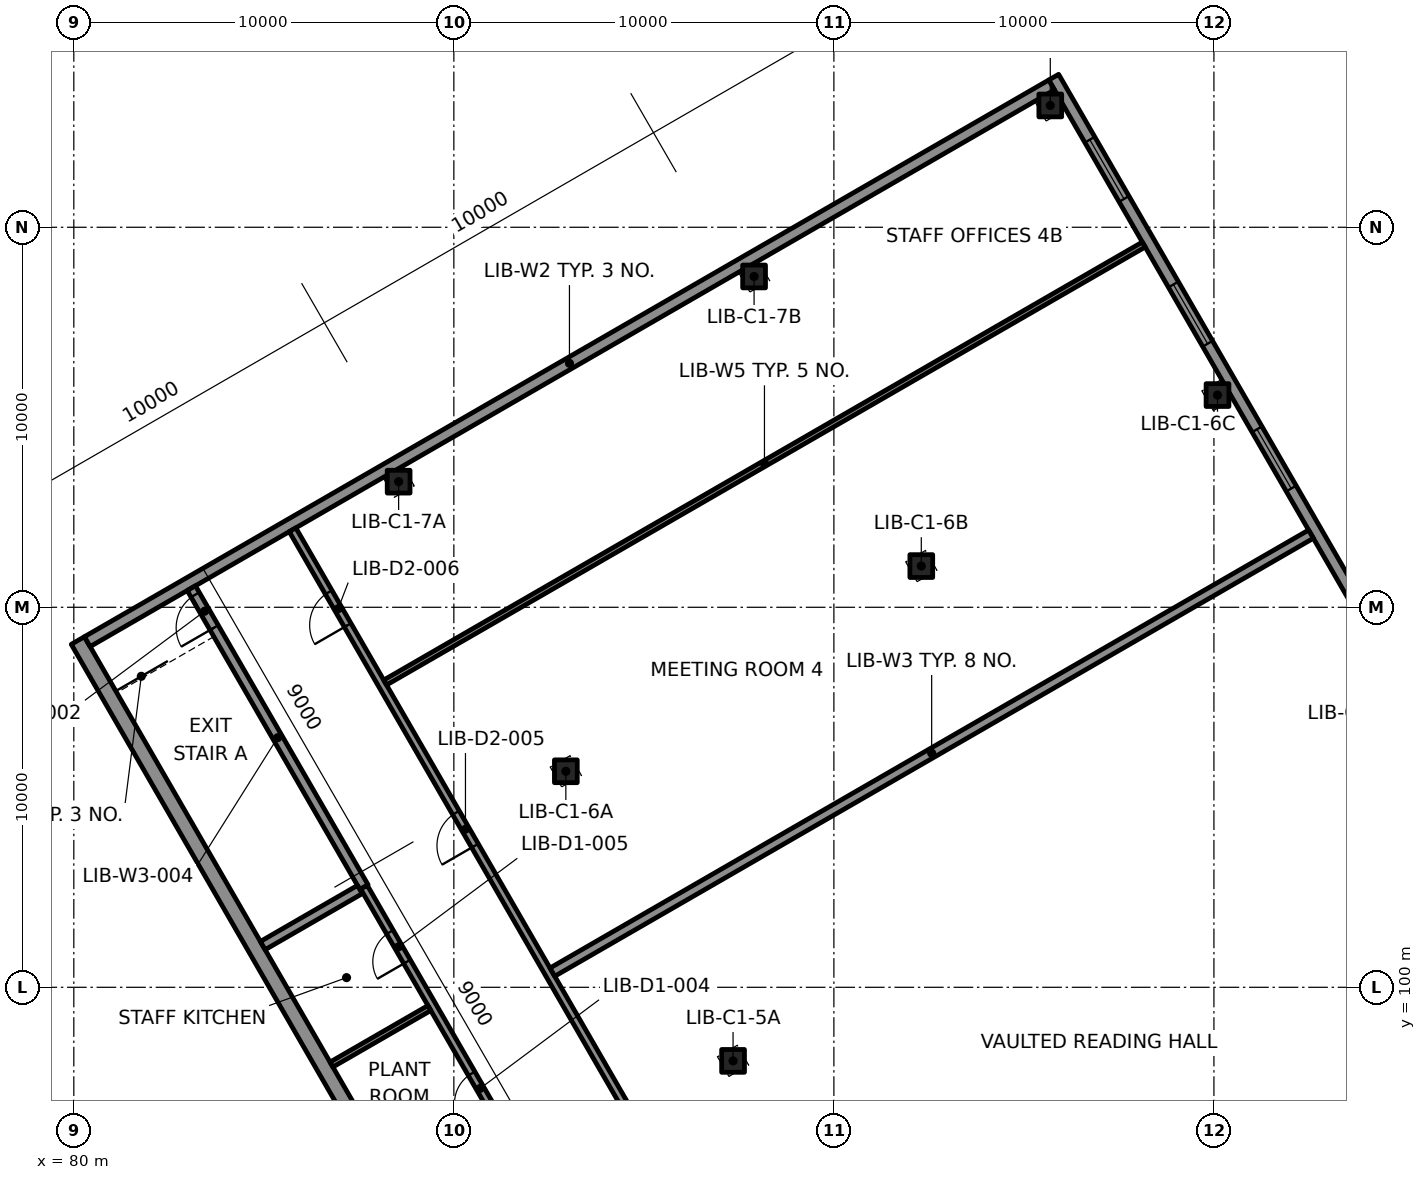
"""IFC4 building model, lengths in metres.
Left out: names, types, materials, properties, quantities, classifications, styles, units other than length and angle.
Written with IfcOpenShell. Run it as: python <this file> out.ifc"""

import sys

from ifc_helpers import new_model, si_unit, direction, frame, frame_2d, origin, origin_2d, place, context, subcontext, project, spatial, rectangle, extrude, element, fill, save


model = new_model("IFC4")
c1 = context("Model", 3, precision=1e-05, world=origin(), true_north=direction((0.0, 1.0)))
c2 = subcontext(c1, "Body", "Model", "MODEL_VIEW")
j1 = project(units=[si_unit("LENGTHUNIT", "METRE"), si_unit("PLANEANGLEUNIT", "RADIAN")], contexts=[c1])
p1 = place(None, origin())
s1 = spatial("IfcSite", under=j1, at=p1, CompositionType="ELEMENT")
p2 = place(p1, origin())
s2 = spatial("IfcBuilding", under=s1, at=p2, CompositionType="ELEMENT")
p3 = place(p2, frame((0.0, 0.0, 21.8)))
s3 = spatial("IfcBuildingStorey", under=s2, at=p3, CompositionType="ELEMENT", Elevation=21.8)
p4 = place(p3, frame((82.621, 101.57, -0.0), z_axis=(0.0, 0.0, 1.0), x_axis=(-0.5, 0.866025403784, 0.0)))
e1 = element("IfcColumn", 1, at=p4, inside=s3, PredefinedType="COLUMN", context=c2, shape_type="SweptSolid", body=[
    extrude(rectangle(XDim=1.2, YDim=1.5, at=origin_2d()), origin(), (0.0, 0.0, 1.0), 4.6),
])
p5 = place(p3, frame((75.975, 98.1, 0.0), z_axis=(0.0, 0.0, 1.0), x_axis=(1.0, 0.0, 0.0)))
e2 = element("IfcWall", 2, at=p5, inside=s3, PredefinedType="PARTITIONING", context=c2, shape_type="SweptSolid", body=[
    extrude(rectangle(XDim=5.649, YDim=0.15, at=frame_2d((2.825, 0.0))), origin(), (0.0, 0.0, 1.0), 3.7),
])
p6 = place(p5, frame((2.375, 0.0, 0.0)))
e3 = element("IfcOpeningElement", 3, at=p6, cuts=e2, PredefinedType="OPENING", context=c2, shape_type="SweptSolid", body=[
    extrude(rectangle(XDim=0.9, YDim=2.1, at=frame_2d((0.45, 1.05))), frame((0.0, 0.085, 0.0), z_axis=(0.0, -1.0, 0.0), x_axis=(1.0, 0.0, 0.0)), (0.0, 0.0, 1.0), 0.17),
])
p7 = place(p3, frame((81.7, 87.5, 0.0), z_axis=(0.0, 0.0, 1.0), x_axis=(0.0, 1.0, 0.0)))
e4 = element("IfcWall", 4, at=p7, inside=s3, PredefinedType="PARTITIONING", context=c2, shape_type="SweptSolid", body=[
    extrude(rectangle(XDim=10.599, YDim=0.15, at=frame_2d((5.3, 0.0))), origin(), (0.0, 0.0, 1.0), 3.7),
])
for number, where, z_axis, x_axis in (
    (5, (97.347, 98.063, -0.36), (0.0, 0.0, 1.0), (1.0, 0.0, 0.0)),
    (6, (92.947, 105.684, -0.36), (0.0, 0.0, 1.0), (1.0, 0.0, 0.0)),
    (7, (102.3, 111.084, -0.36), (0.0, 0.0, 1.0), (1.0, 0.0, 0.0)),
    (8, (110.094, 115.584, -0.36), (0.0, 0.0, 1.0), (1.0, 0.0, 0.0)),
    (9, (88.547, 113.305, -0.36), (0.0, 0.0, 1.0), (1.0, 0.0, 0.0)),
    (10, (97.9, 118.705, -0.36), (0.0, 0.0, 1.0), (1.0, 0.0, 0.0)),
    (11, (105.694, 123.205, -0.36), (0.0, 0.0, 1.0), (1.0, 0.0, 0.0)),
):
    element("IfcColumn", number, at=place(p3, frame(where, z_axis=z_axis, x_axis=x_axis)), inside=s3, PredefinedType="COLUMN", context=c2, shape_type="SweptSolid", body=[
        extrude(rectangle(XDim=0.6, YDim=0.6, at=origin_2d()), origin(), (0.0, 0.0, 1.0), 4.66),
    ])
p8 = place(p3, frame((107.106, 62.36, 0.0), z_axis=(0.0, 0.0, 1.0), x_axis=(-0.49999992739, 0.866025445706, 0.0)))
e12 = element("IfcWall", 12, at=p8, inside=s3, PredefinedType="SOLIDWALL", context=c2, shape_type="SweptSolid", body=[
    extrude(rectangle(XDim=54.0, YDim=0.4, at=frame_2d((27.0, 0.0))), origin(), (0.0, 0.0, 1.0), 4.3),
])
p9 = place(p3, frame((132.784, 77.185, 0.0), z_axis=(0.0, 0.0, 1.0), x_axis=(-0.49999992739, 0.866025445706, 0.0)))
e13 = element("IfcWall", 13, at=p9, inside=s3, PredefinedType="SOLIDWALL", context=c2, shape_type="SweptSolid", body=[
    extrude(rectangle(XDim=54.0, YDim=0.3, at=frame_2d((27.0, 0.0))), origin(), (0.0, 0.0, 1.0), 4.3),
])
p10 = place(p9, frame((1.9, 0.0, 0.9)))
e14 = element("IfcOpeningElement", 14, at=p10, cuts=e13, PredefinedType="OPENING", context=c2, shape_type="SweptSolid", body=[
    extrude(rectangle(XDim=1.8, YDim=2.4, at=frame_2d((0.9, 1.2))), frame((0.0, 0.16, 0.0), z_axis=(0.0, -1.0, 0.0), x_axis=(1.0, 0.0, 0.0)), (0.0, 0.0, 1.0), 0.32),
])
p11 = place(p9, frame((6.3, 0.0, 0.9)))
e15 = element("IfcOpeningElement", 15, at=p11, cuts=e13, PredefinedType="OPENING", context=c2, shape_type="SweptSolid", body=[
    extrude(rectangle(XDim=1.8, YDim=2.4, at=frame_2d((0.9, 1.2))), frame((0.0, 0.16, 0.0), z_axis=(0.0, -1.0, 0.0), x_axis=(1.0, 0.0, 0.0)), (0.0, 0.0, 1.0), 0.32),
])
p12 = place(p9, frame((10.7, 0.0, 0.9)))
e16 = element("IfcOpeningElement", 16, at=p12, cuts=e13, PredefinedType="OPENING", context=c2, shape_type="SweptSolid", body=[
    extrude(rectangle(XDim=1.8, YDim=2.4, at=frame_2d((0.9, 1.2))), frame((0.0, 0.16, 0.0), z_axis=(0.0, -1.0, 0.0), x_axis=(1.0, 0.0, 0.0)), (0.0, 0.0, 1.0), 0.32),
])
p13 = place(p9, frame((15.1, 0.0, 0.9)))
e17 = element("IfcOpeningElement", 17, at=p13, cuts=e13, PredefinedType="OPENING", context=c2, shape_type="SweptSolid", body=[
    extrude(rectangle(XDim=1.8, YDim=2.4, at=frame_2d((0.9, 1.2))), frame((0.0, 0.16, 0.0), z_axis=(0.0, -1.0, 0.0), x_axis=(1.0, 0.0, 0.0)), (0.0, 0.0, 1.0), 0.32),
])
p14 = place(p9, frame((19.5, 0.0, 0.9)))
e18 = element("IfcOpeningElement", 18, at=p14, cuts=e13, PredefinedType="OPENING", context=c2, shape_type="SweptSolid", body=[
    extrude(rectangle(XDim=1.8, YDim=2.4, at=frame_2d((0.9, 1.2))), frame((0.0, 0.16, 0.0), z_axis=(0.0, -1.0, 0.0), x_axis=(1.0, 0.0, 0.0)), (0.0, 0.0, 1.0), 0.32),
])
p15 = place(p9, frame((41.5, 0.0, 0.9)))
e19 = element("IfcOpeningElement", 19, at=p15, cuts=e13, PredefinedType="OPENING", context=c2, shape_type="SweptSolid", body=[
    extrude(rectangle(XDim=1.8, YDim=2.4, at=frame_2d((0.9, 1.2))), frame((0.0, 0.16, 0.0), z_axis=(0.0, -1.0, 0.0), x_axis=(1.0, 0.0, 0.0)), (0.0, 0.0, 1.0), 0.32),
])
p16 = place(p9, frame((45.9, 0.0, 0.9)))
e20 = element("IfcOpeningElement", 20, at=p16, cuts=e13, PredefinedType="OPENING", context=c2, shape_type="SweptSolid", body=[
    extrude(rectangle(XDim=1.8, YDim=2.4, at=frame_2d((0.9, 1.2))), frame((0.0, 0.16, 0.0), z_axis=(0.0, -1.0, 0.0), x_axis=(1.0, 0.0, 0.0)), (0.0, 0.0, 1.0), 0.32),
])
p17 = place(p9, frame((50.3, 0.0, 0.9)))
e21 = element("IfcOpeningElement", 21, at=p17, cuts=e13, PredefinedType="OPENING", context=c2, shape_type="SweptSolid", body=[
    extrude(rectangle(XDim=1.8, YDim=2.4, at=frame_2d((0.9, 1.2))), frame((0.0, 0.16, 0.0), z_axis=(0.0, -1.0, 0.0), x_axis=(1.0, 0.0, 0.0)), (0.0, 0.0, 1.0), 0.32),
])
p18 = place(p3, frame((80.354, 109.095, 0.0), z_axis=(0.0, 0.0, 1.0), x_axis=(0.866026568746, 0.499997982221, 0.0)))
e22 = element("IfcWall", 22, at=p18, inside=s3, PredefinedType="SOLIDWALL", context=c2, shape_type="SweptSolid", body=[
    extrude(rectangle(XDim=29.3, YDim=0.3, at=frame_2d((14.65, 0.0))), origin(), (0.0, 0.0, 1.0), 4.3),
])
p19 = place(p3, frame((87.635, 102.635, 0.0), z_axis=(0.0, 0.0, 1.0), x_axis=(-0.499994616197, 0.866028512102, 0.0)))
e23 = element("IfcWall", 23, at=p19, inside=s3, PredefinedType="SOLIDWALL", context=c2, shape_type="SweptSolid", body=[
    extrude(rectangle(XDim=9.085, YDim=0.25, at=frame_2d((4.542, 0.0))), origin(), (0.0, 0.0, 1.0), 4.3),
])
p20 = place(p19, frame((7.885, 0.0, 0.0)))
e24 = element("IfcOpeningElement", 24, at=p20, cuts=e23, PredefinedType="OPENING", context=c2, shape_type="SweptSolid", body=[
    extrude(rectangle(XDim=1.0, YDim=2.1, at=frame_2d((0.5, 1.05))), frame((0.0, 0.135, 0.0), z_axis=(0.0, -1.0, 0.0), x_axis=(1.0, 0.0, 0.0)), (0.0, 0.0, 1.0), 0.27),
])
p21 = place(p3, frame((94.93, 90.0, 0.0), z_axis=(0.0, 0.0, 1.0), x_axis=(-0.499997667785, 0.866026750285, 0.0)))
e25 = element("IfcWall", 25, at=p21, inside=s3, PredefinedType="PARTITIONING", context=c2, shape_type="SweptSolid", body=[
    extrude(rectangle(XDim=14.59, YDim=0.2, at=frame_2d((7.295, 0.0))), origin(), (0.0, 0.0, 1.0), 4.3),
])
p22 = place(p21, frame((1.235, 0.0, 0.0)))
e26 = element("IfcOpeningElement", 26, at=p22, cuts=e25, PredefinedType="OPENING", context=c2, shape_type="SweptSolid", body=[
    extrude(rectangle(XDim=1.0, YDim=2.1, at=frame_2d((0.5, 1.05))), frame((0.0, 0.11, 0.0), z_axis=(0.0, -1.0, 0.0), x_axis=(1.0, 0.0, 0.0)), (0.0, 0.0, 1.0), 0.22),
])
p23 = place(p21, frame((4.275, 0.0, 0.0)))
e27 = element("IfcOpeningElement", 27, at=p23, cuts=e25, PredefinedType="OPENING", context=c2, shape_type="SweptSolid", body=[
    extrude(rectangle(XDim=0.9, YDim=2.1, at=frame_2d((0.45, 1.05))), frame((0.0, 0.11, 0.0), z_axis=(0.0, -1.0, 0.0), x_axis=(1.0, 0.0, 0.0)), (0.0, 0.0, 1.0), 0.22),
])
p24 = place(p21, frame((8.025, 0.0, 0.0)))
e28 = element("IfcOpeningElement", 28, at=p24, cuts=e25, PredefinedType="OPENING", context=c2, shape_type="SweptSolid", body=[
    extrude(rectangle(XDim=0.9, YDim=2.1, at=frame_2d((0.45, 1.05))), frame((0.0, 0.11, 0.0), z_axis=(0.0, -1.0, 0.0), x_axis=(1.0, 0.0, 0.0)), (0.0, 0.0, 1.0), 0.22),
])
p25 = place(p21, frame((12.325, 0.0, 0.0)))
e29 = element("IfcOpeningElement", 29, at=p25, cuts=e25, PredefinedType="OPENING", context=c2, shape_type="SweptSolid", body=[
    extrude(rectangle(XDim=0.9, YDim=2.1, at=frame_2d((0.45, 1.05))), frame((0.0, 0.11, 0.0), z_axis=(0.0, -1.0, 0.0), x_axis=(1.0, 0.0, 0.0)), (0.0, 0.0, 1.0), 0.22),
])
p26 = place(p3, frame((86.779, 97.967, 0.0), z_axis=(0.0, 0.0, 1.0), x_axis=(0.866053027861, 0.499952150643, 0.0)))
e30 = element("IfcWall", 30, at=p26, inside=s3, PredefinedType="PARTITIONING", context=c2, shape_type="SweptSolid", body=[
    extrude(rectangle(XDim=2.975, YDim=0.15, at=frame_2d((1.487, 0.0))), origin(), (0.0, 0.0, 1.0), 4.3),
])
p27 = place(p3, frame((84.972, 101.097, 0.0), z_axis=(0.0, 0.0, 1.0), x_axis=(0.866039495442, 0.49997559174, 0.0)))
e31 = element("IfcWall", 31, at=p27, inside=s3, PredefinedType="SOLIDWALL", context=c2, shape_type="SweptSolid", body=[
    extrude(rectangle(XDim=2.95, YDim=0.25, at=frame_2d((1.475, 0.0))), origin(), (0.0, 0.0, 1.0), 4.3),
])
p28 = place(p3, frame((112.496, 65.725, 0.0), z_axis=(0.0, 0.0, 1.0), x_axis=(-0.499998673217, 0.866026169802, 0.0)))
e32 = element("IfcWall", 32, at=p28, inside=s3, PredefinedType="PARTITIONING", context=c2, shape_type="SweptSolid", body=[
    extrude(rectangle(XDim=53.48, YDim=0.2, at=frame_2d((26.74, 0.0))), origin(), (0.0, 0.0, 1.0), 4.3),
])
p29 = place(p28, frame((13.08, 0.0, 0.0)))
e33 = element("IfcOpeningElement", 33, at=p29, cuts=e32, PredefinedType="OPENING", context=c2, shape_type="SweptSolid", body=[
    extrude(rectangle(XDim=1.0, YDim=2.1, at=frame_2d((0.5, 1.05))), frame((0.0, 0.11, 0.0), z_axis=(0.0, -1.0, 0.0), x_axis=(1.0, 0.0, 0.0)), (0.0, 0.0, 1.0), 0.22),
])
p30 = place(p28, frame((26.28, 0.0, 0.0)))
e34 = element("IfcOpeningElement", 34, at=p30, cuts=e32, PredefinedType="OPENING", context=c2, shape_type="SweptSolid", body=[
    extrude(rectangle(XDim=1.0, YDim=2.1, at=frame_2d((0.5, 1.05))), frame((0.0, 0.11, 0.0), z_axis=(0.0, -1.0, 0.0), x_axis=(1.0, 0.0, 0.0)), (0.0, 0.0, 1.0), 0.22),
])
p31 = place(p28, frame((43.88, 0.0, 0.0)))
e35 = element("IfcOpeningElement", 35, at=p31, cuts=e32, PredefinedType="OPENING", context=c2, shape_type="SweptSolid", body=[
    extrude(rectangle(XDim=1.0, YDim=2.1, at=frame_2d((0.5, 1.05))), frame((0.0, 0.11, 0.0), z_axis=(0.0, -1.0, 0.0), x_axis=(1.0, 0.0, 0.0)), (0.0, 0.0, 1.0), 0.22),
])
p32 = place(p28, frame((50.58, 0.0, 0.0)))
e36 = element("IfcOpeningElement", 36, at=p32, cuts=e32, PredefinedType="OPENING", context=c2, shape_type="SweptSolid", body=[
    extrude(rectangle(XDim=1.0, YDim=2.1, at=frame_2d((0.5, 1.05))), frame((0.0, 0.11, 0.0), z_axis=(0.0, -1.0, 0.0), x_axis=(1.0, 0.0, 0.0)), (0.0, 0.0, 1.0), 0.22),
])
p33 = place(p3, frame((92.592, 100.399, 0.0), z_axis=(0.0, 0.0, 1.0), x_axis=(0.866022961126, 0.500004230785, 0.0)))
e37 = element("IfcWall", 37, at=p33, inside=s3, PredefinedType="SOLIDWALL", context=c2, shape_type="SweptSolid", body=[
    extrude(rectangle(XDim=23.05, YDim=0.25, at=frame_2d((11.525, 0.0))), origin(), (0.0, 0.0, 1.0), 4.3),
])
p34 = place(p3, frame((88.192, 108.02, 0.0), z_axis=(0.0, 0.0, 1.0), x_axis=(0.866027547497, 0.499996286962, 0.0)))
e38 = element("IfcWall", 38, at=p34, inside=s3, PredefinedType="PARTITIONING", context=c2, shape_type="SweptSolid", body=[
    extrude(rectangle(XDim=23.05, YDim=0.15, at=frame_2d((11.525, 0.0))), origin(), (0.0, 0.0, 1.0), 4.3),
])
p35 = place(p15, origin())
e39 = element("IfcWindow", 39, at=p35, inside=s3, PartitioningType="SINGLE_PANEL", PredefinedType="WINDOW", context=c2, shape_type="SweptSolid", body=[
    extrude(rectangle(XDim=1.8, YDim=2.4, at=frame_2d((0.9, 1.2))), frame((0.0, 0.03, 0.0), z_axis=(0.0, -1.0, 0.0), x_axis=(1.0, 0.0, 0.0)), (0.0, 0.0, 1.0), 0.06),
])
fill(e19, e39)
p36 = place(p16, origin())
e40 = element("IfcWindow", 40, at=p36, inside=s3, PartitioningType="SINGLE_PANEL", PredefinedType="WINDOW", context=c2, shape_type="SweptSolid", body=[
    extrude(rectangle(XDim=1.8, YDim=2.4, at=frame_2d((0.9, 1.2))), frame((0.0, 0.03, 0.0), z_axis=(0.0, -1.0, 0.0), x_axis=(1.0, 0.0, 0.0)), (0.0, 0.0, 1.0), 0.06),
])
fill(e20, e40)
p37 = place(p17, origin())
e41 = element("IfcWindow", 41, at=p37, inside=s3, PartitioningType="SINGLE_PANEL", PredefinedType="WINDOW", context=c2, shape_type="SweptSolid", body=[
    extrude(rectangle(XDim=1.8, YDim=2.4, at=frame_2d((0.9, 1.2))), frame((0.0, 0.03, 0.0), z_axis=(0.0, -1.0, 0.0), x_axis=(1.0, 0.0, 0.0)), (0.0, 0.0, 1.0), 0.06),
])
fill(e21, e41)
p38 = place(p20, origin())
e42 = element("IfcDoor", 42, at=p38, inside=s3, OperationType="SINGLE_SWING_RIGHT", PredefinedType="DOOR", context=c2, shape_type="SweptSolid", body=[
    extrude(rectangle(XDim=1.0, YDim=2.1, at=frame_2d((0.5, 1.05))), frame((0.0, 0.025, 0.0), z_axis=(0.0, -1.0, 0.0), x_axis=(1.0, 0.0, 0.0)), (0.0, 0.0, 1.0), 0.05),
])
fill(e24, e42)
p39 = place(p24, origin())
e43 = element("IfcDoor", 43, at=p39, inside=s3, OperationType="SINGLE_SWING_RIGHT", PredefinedType="DOOR", context=c2, shape_type="SweptSolid", body=[
    extrude(rectangle(XDim=0.9, YDim=2.1, at=frame_2d((0.45, 1.05))), frame((0.0, 0.025, 0.0), z_axis=(0.0, -1.0, 0.0), x_axis=(1.0, 0.0, 0.0)), (0.0, 0.0, 1.0), 0.05),
])
fill(e28, e43)
p40 = place(p25, origin())
e44 = element("IfcDoor", 44, at=p40, inside=s3, OperationType="SINGLE_SWING_LEFT", PredefinedType="DOOR", context=c2, shape_type="SweptSolid", body=[
    extrude(rectangle(XDim=0.9, YDim=2.1, at=frame_2d((0.45, 1.05))), frame((0.0, 0.025, 0.0), z_axis=(0.0, -1.0, 0.0), x_axis=(1.0, 0.0, 0.0)), (0.0, 0.0, 1.0), 0.05),
])
fill(e29, e44)
p41 = place(p31, origin())
e45 = element("IfcDoor", 45, at=p41, inside=s3, OperationType="SINGLE_SWING_LEFT", PredefinedType="DOOR", context=c2, shape_type="SweptSolid", body=[
    extrude(rectangle(XDim=1.0, YDim=2.1, at=frame_2d((0.5, 1.05))), frame((0.0, 0.025, 0.0), z_axis=(0.0, -1.0, 0.0), x_axis=(1.0, 0.0, 0.0)), (0.0, 0.0, 1.0), 0.05),
])
fill(e35, e45)
p42 = place(p32, origin())
e46 = element("IfcDoor", 46, at=p42, inside=s3, OperationType="SINGLE_SWING_RIGHT", PredefinedType="DOOR", context=c2, shape_type="SweptSolid", body=[
    extrude(rectangle(XDim=1.0, YDim=2.1, at=frame_2d((0.5, 1.05))), frame((0.0, 0.025, 0.0), z_axis=(0.0, -1.0, 0.0), x_axis=(1.0, 0.0, 0.0)), (0.0, 0.0, 1.0), 0.05),
])
fill(e36, e46)
save(model, sys.argv[1])
